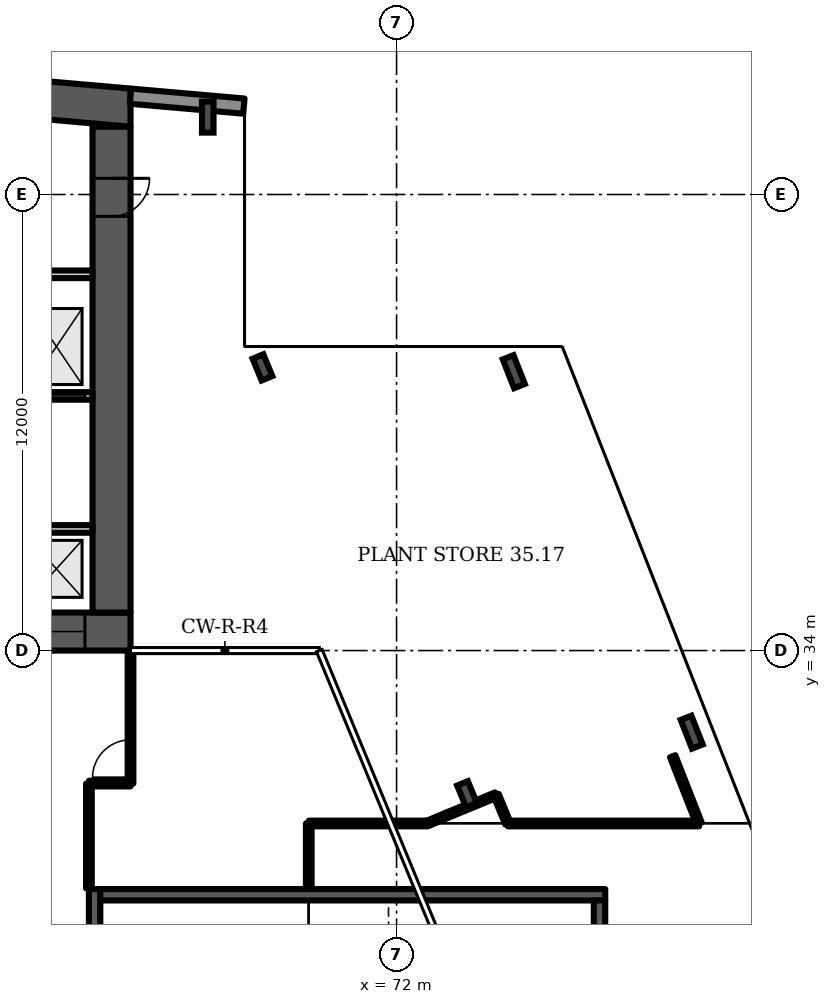
"""IFC4 building model, lengths in metres.
Left out: names, types, materials, properties, quantities, classifications, styles, units other than length and angle.
Written with IfcOpenShell. Run it as: python <this file> out.ifc"""

import sys

from ifc_helpers import new_model, si_unit, direction, frame, frame_2d, origin, origin_2d, place, context, subcontext, project, spatial, polyline, rectangle, i_section, outline, extrude, element, fill, save


model = new_model("IFC4")
c1 = context("Model", 3, precision=1e-05, world=origin(), true_north=direction((0.0, 1.0)))
c2 = subcontext(c1, "Body", "Model", "MODEL_VIEW")
j1 = project(units=[si_unit("LENGTHUNIT", "METRE"), si_unit("PLANEANGLEUNIT", "RADIAN")], contexts=[c1])
p1 = place(None, origin())
s1 = spatial("IfcSite", under=j1, at=p1, CompositionType="ELEMENT")
p2 = place(p1, origin())
s2 = spatial("IfcBuilding", under=s1, at=p2, CompositionType="ELEMENT")
p3 = place(p2, frame((0.0, 0.0, 147.1)))
s3 = spatial("IfcBuildingStorey", under=s2, at=p3, CompositionType="ELEMENT", Elevation=147.1)
p4 = place(p3, frame((0.0, 0.0, -0.0)))
e1 = element("IfcWall", 1, at=p4, inside=s3, PredefinedType="SHEAR", context=c2, shape_type="SweptSolid", body=[
    extrude(outline(polyline([(16.0, 47.784), (40.5, 49.927), (65.0, 47.784), (65.0, 48.787), (40.5, 50.931), (16.0, 48.787), (16.0, 47.784)])), origin(), (0.0, 0.0, 1.0), 4.8),
])
p5 = place(p3, frame((16.0, 34.5, 0.0), z_axis=(0.0, 0.0, 1.0), x_axis=(1.0, 0.0, 0.0)))
e2 = element("IfcWall", 2, at=p5, inside=s3, PredefinedType="SHEAR", context=c2, shape_type="SweptSolid", body=[
    extrude(rectangle(XDim=49.0, YDim=1.0, at=frame_2d((24.5, 0.0))), origin(), (0.0, 0.0, 1.0), 4.8),
])
p6 = place(p5, frame((1.2, 0.0, 0.0)))
e3 = element("IfcOpeningElement", 3, at=p6, cuts=e2, PredefinedType="OPENING", context=c2, shape_type="SweptSolid", body=[
    extrude(rectangle(XDim=1.1, YDim=2.1, at=frame_2d((0.55, 1.05))), frame((0.0, 0.51, 0.0), z_axis=(0.0, -1.0, 0.0), x_axis=(1.0, 0.0, 0.0)), (0.0, 0.0, 1.0), 1.02),
])
p7 = place(p5, frame((5.083, 0.0, 0.0)))
e4 = element("IfcOpeningElement", 4, at=p7, cuts=e2, PredefinedType="OPENING", context=c2, shape_type="SweptSolid", body=[
    extrude(rectangle(XDim=1.1, YDim=2.1, at=frame_2d((0.55, 1.05))), frame((0.0, 0.51, 0.0), z_axis=(0.0, -1.0, 0.0), x_axis=(1.0, 0.0, 0.0)), (0.0, 0.0, 1.0), 1.02),
])
p8 = place(p5, frame((2.933, 0.0, 0.0)))
e5 = element("IfcOpeningElement", 5, at=p8, cuts=e2, PredefinedType="OPENING", context=c2, shape_type="SweptSolid", body=[
    extrude(rectangle(XDim=1.4, YDim=2.1, at=frame_2d((0.7, 1.05))), frame((0.0, 0.51, 0.0), z_axis=(0.0, -1.0, 0.0), x_axis=(1.0, 0.0, 0.0)), (0.0, 0.0, 1.0), 1.02),
])
p9 = place(p5, frame((7.65, 0.0, 0.0)))
e6 = element("IfcOpeningElement", 6, at=p9, cuts=e2, PredefinedType="OPENING", context=c2, shape_type="SweptSolid", body=[
    extrude(rectangle(XDim=1.2, YDim=2.1, at=frame_2d((0.6, 1.05))), frame((0.0, 0.51, 0.0), z_axis=(0.0, -1.0, 0.0), x_axis=(1.0, 0.0, 0.0)), (0.0, 0.0, 1.0), 1.02),
])
p10 = place(p5, frame((14.817, 0.0, 0.0)))
e7 = element("IfcOpeningElement", 7, at=p10, cuts=e2, PredefinedType="OPENING", context=c2, shape_type="SweptSolid", body=[
    extrude(rectangle(XDim=1.1, YDim=2.1, at=frame_2d((0.55, 1.05))), frame((0.0, 0.51, 0.0), z_axis=(0.0, -1.0, 0.0), x_axis=(1.0, 0.0, 0.0)), (0.0, 0.0, 1.0), 1.02),
])
p11 = place(p5, frame((19.083, 0.0, 0.0)))
e8 = element("IfcOpeningElement", 8, at=p11, cuts=e2, PredefinedType="OPENING", context=c2, shape_type="SweptSolid", body=[
    extrude(rectangle(XDim=1.1, YDim=2.1, at=frame_2d((0.55, 1.05))), frame((0.0, 0.51, 0.0), z_axis=(0.0, -1.0, 0.0), x_axis=(1.0, 0.0, 0.0)), (0.0, 0.0, 1.0), 1.02),
])
p12 = place(p5, frame((16.8, 0.0, 0.0)))
e9 = element("IfcOpeningElement", 9, at=p12, cuts=e2, PredefinedType="OPENING", context=c2, shape_type="SweptSolid", body=[
    extrude(rectangle(XDim=1.4, YDim=2.1, at=frame_2d((0.7, 1.05))), frame((0.0, 0.51, 0.0), z_axis=(0.0, -1.0, 0.0), x_axis=(1.0, 0.0, 0.0)), (0.0, 0.0, 1.0), 1.02),
])
p13 = place(p5, frame((21.817, 0.0, 0.0)))
e10 = element("IfcOpeningElement", 10, at=p13, cuts=e2, PredefinedType="OPENING", context=c2, shape_type="SweptSolid", body=[
    extrude(rectangle(XDim=1.1, YDim=2.1, at=frame_2d((0.55, 1.05))), frame((0.0, 0.51, 0.0), z_axis=(0.0, -1.0, 0.0), x_axis=(1.0, 0.0, 0.0)), (0.0, 0.0, 1.0), 1.02),
])
p14 = place(p5, frame((23.95, 0.0, 0.0)))
e11 = element("IfcOpeningElement", 11, at=p14, cuts=e2, PredefinedType="OPENING", context=c2, shape_type="SweptSolid", body=[
    extrude(rectangle(XDim=1.1, YDim=2.1, at=frame_2d((0.55, 1.05))), frame((0.0, 0.51, 0.0), z_axis=(0.0, -1.0, 0.0), x_axis=(1.0, 0.0, 0.0)), (0.0, 0.0, 1.0), 1.02),
])
p15 = place(p5, frame((26.083, 0.0, 0.0)))
e12 = element("IfcOpeningElement", 12, at=p15, cuts=e2, PredefinedType="OPENING", context=c2, shape_type="SweptSolid", body=[
    extrude(rectangle(XDim=1.1, YDim=2.1, at=frame_2d((0.55, 1.05))), frame((0.0, 0.51, 0.0), z_axis=(0.0, -1.0, 0.0), x_axis=(1.0, 0.0, 0.0)), (0.0, 0.0, 1.0), 1.02),
])
p16 = place(p5, frame((33.15, 0.0, 0.0)))
e13 = element("IfcOpeningElement", 13, at=p16, cuts=e2, PredefinedType="OPENING", context=c2, shape_type="SweptSolid", body=[
    extrude(rectangle(XDim=1.2, YDim=2.1, at=frame_2d((0.6, 1.05))), frame((0.0, 0.51, 0.0), z_axis=(0.0, -1.0, 0.0), x_axis=(1.0, 0.0, 0.0)), (0.0, 0.0, 1.0), 1.02),
])
p17 = place(p5, frame((35.817, 0.0, 0.0)))
e14 = element("IfcOpeningElement", 14, at=p17, cuts=e2, PredefinedType="OPENING", context=c2, shape_type="SweptSolid", body=[
    extrude(rectangle(XDim=1.1, YDim=2.1, at=frame_2d((0.55, 1.05))), frame((0.0, 0.51, 0.0), z_axis=(0.0, -1.0, 0.0), x_axis=(1.0, 0.0, 0.0)), (0.0, 0.0, 1.0), 1.02),
])
p18 = place(p5, frame((40.083, 0.0, 0.0)))
e15 = element("IfcOpeningElement", 15, at=p18, cuts=e2, PredefinedType="OPENING", context=c2, shape_type="SweptSolid", body=[
    extrude(rectangle(XDim=1.1, YDim=2.1, at=frame_2d((0.55, 1.05))), frame((0.0, 0.51, 0.0), z_axis=(0.0, -1.0, 0.0), x_axis=(1.0, 0.0, 0.0)), (0.0, 0.0, 1.0), 1.02),
])
p19 = place(p5, frame((37.8, 0.0, 0.0)))
e16 = element("IfcOpeningElement", 16, at=p19, cuts=e2, PredefinedType="OPENING", context=c2, shape_type="SweptSolid", body=[
    extrude(rectangle(XDim=1.4, YDim=2.1, at=frame_2d((0.7, 1.05))), frame((0.0, 0.51, 0.0), z_axis=(0.0, -1.0, 0.0), x_axis=(1.0, 0.0, 0.0)), (0.0, 0.0, 1.0), 1.02),
])
p20 = place(p5, frame((42.817, 0.0, 0.0)))
e17 = element("IfcOpeningElement", 17, at=p20, cuts=e2, PredefinedType="OPENING", context=c2, shape_type="SweptSolid", body=[
    extrude(rectangle(XDim=1.1, YDim=2.1, at=frame_2d((0.55, 1.05))), frame((0.0, 0.51, 0.0), z_axis=(0.0, -1.0, 0.0), x_axis=(1.0, 0.0, 0.0)), (0.0, 0.0, 1.0), 1.02),
])
p21 = place(p5, frame((46.7, 0.0, 0.0)))
e18 = element("IfcOpeningElement", 18, at=p21, cuts=e2, PredefinedType="OPENING", context=c2, shape_type="SweptSolid", body=[
    extrude(rectangle(XDim=1.1, YDim=2.1, at=frame_2d((0.55, 1.05))), frame((0.0, 0.51, 0.0), z_axis=(0.0, -1.0, 0.0), x_axis=(1.0, 0.0, 0.0)), (0.0, 0.0, 1.0), 1.02),
])
p22 = place(p5, frame((44.667, 0.0, 0.0)))
e19 = element("IfcOpeningElement", 19, at=p22, cuts=e2, PredefinedType="OPENING", context=c2, shape_type="SweptSolid", body=[
    extrude(rectangle(XDim=1.4, YDim=2.1, at=frame_2d((0.7, 1.05))), frame((0.0, 0.51, 0.0), z_axis=(0.0, -1.0, 0.0), x_axis=(1.0, 0.0, 0.0)), (0.0, 0.0, 1.0), 1.02),
])
p23 = place(p3, frame((64.5, 35.0, 0.0), z_axis=(0.0, 0.0, 1.0), x_axis=(0.0, 1.0, 0.0)))
e20 = element("IfcWall", 20, at=p23, inside=s3, PredefinedType="SHEAR", context=c2, shape_type="SweptSolid", body=[
    extrude(rectangle(XDim=12.784, YDim=1.0, at=frame_2d((6.392, 0.0))), origin(), (0.0, 0.0, 1.0), 4.8),
])
p24 = place(p23, frame((10.426, 0.0, 0.0)))
e21 = element("IfcOpeningElement", 21, at=p24, cuts=e20, PredefinedType="OPENING", context=c2, shape_type="SweptSolid", body=[
    extrude(rectangle(XDim=1.0, YDim=2.1, at=frame_2d((0.5, 1.05))), frame((0.0, 0.51, 0.0), z_axis=(0.0, -1.0, 0.0), x_axis=(1.0, 0.0, 0.0)), (0.0, 0.0, 1.0), 1.02),
])
for number, where, z_axis, x_axis in (
    (22, (73.854, 30.219, 0.0), (0.0, 0.0, 1.0), (0.924, 0.382, 0.0)),
    (23, (68.472, 41.45, 0.0), (0.0, 0.0, 1.0), (0.924, 0.382, 0.0)),
):
    element("IfcColumn", number, at=place(p3, frame(where, z_axis=z_axis, x_axis=x_axis)), inside=s3, PredefinedType="COLUMN", context=c2, shape_type="SweptSolid", body=[
        extrude(i_section(OverallWidth=0.305, OverallDepth=0.62, WebThickness=0.021, FlangeThickness=0.04, FilletRadius=0.027, at=origin_2d()), origin(), (0.0, 0.0, 1.0), 4.8),
    ])
for number, where, z_axis, x_axis in (
    (24, (79.766, 31.853, 0.0), (0.0, 0.0, 1.0), (0.931, 0.366, 0.0)),
    (25, (75.085, 41.338, 0.0), (0.0, 0.0, 1.0), (0.931, 0.366, 0.0)),
    (26, (67.032, 48.036, 0.0), (0.0, 0.0, 1.0), (1.0, 0.0, 0.0)),
):
    element("IfcColumn", number, at=place(p3, frame(where, z_axis=z_axis, x_axis=x_axis)), inside=s3, PredefinedType="COLUMN", context=c2, shape_type="SweptSolid", body=[
        extrude(i_section(OverallWidth=0.303, OverallDepth=0.814, WebThickness=0.021, FlangeThickness=0.04, FilletRadius=0.03, at=origin_2d()), origin(), (0.0, 0.0, 1.0), 4.8),
    ])
p25 = place(p3, frame((67.983, 48.326, 0.0), z_axis=(0.0, 0.0, 1.0), x_axis=(-0.996194, 0.087168, 0.0)))
e27 = element("IfcWall", 27, at=p25, inside=s3, PredefinedType="SOLIDWALL", context=c2, shape_type="SweptSolid", body=[
    extrude(rectangle(XDim=2.994, YDim=0.4, at=frame_2d((1.497, 0.0))), origin(), (0.0, 0.0, 1.0), 4.4),
])
p26 = place(p3, frame((58.5, 40.7, 0.0), z_axis=(0.0, 0.0, 1.0), x_axis=(1.0, 0.0, 0.0)))
e28 = element("IfcWall", 28, at=p26, inside=s3, PredefinedType="PARTITIONING", context=c2, shape_type="SweptSolid", body=[
    extrude(rectangle(XDim=5.5, YDim=0.2, at=frame_2d((2.75, 0.0))), origin(), (0.0, 0.0, 1.0), 4.4),
])
p27 = place(p26, frame((0.317, 0.0, 0.0)))
e29 = element("IfcOpeningElement", 29, at=p27, cuts=e28, PredefinedType="OPENING", context=c2, shape_type="SweptSolid", body=[
    extrude(rectangle(XDim=1.1, YDim=2.1, at=frame_2d((0.55, 1.05))), frame((0.0, 0.11, 0.0), z_axis=(0.0, -1.0, 0.0), x_axis=(1.0, 0.0, 0.0)), (0.0, 0.0, 1.0), 0.22),
])
p28 = place(p26, frame((2.317, 0.0, 0.0)))
e30 = element("IfcOpeningElement", 30, at=p28, cuts=e28, PredefinedType="OPENING", context=c2, shape_type="SweptSolid", body=[
    extrude(rectangle(XDim=1.1, YDim=2.1, at=frame_2d((0.55, 1.05))), frame((0.0, 0.11, 0.0), z_axis=(0.0, -1.0, 0.0), x_axis=(1.0, 0.0, 0.0)), (0.0, 0.0, 1.0), 0.22),
])
p29 = place(p26, frame((4.2, 0.0, 0.0)))
e31 = element("IfcOpeningElement", 31, at=p29, cuts=e28, PredefinedType="OPENING", context=c2, shape_type="SweptSolid", body=[
    extrude(rectangle(XDim=1.1, YDim=2.1, at=frame_2d((0.55, 1.05))), frame((0.0, 0.11, 0.0), z_axis=(0.0, -1.0, 0.0), x_axis=(1.0, 0.0, 0.0)), (0.0, 0.0, 1.0), 0.22),
])
p30 = place(p3, frame((0.0, 0.0, -0.0)))
e32 = element("IfcWall", 32, at=p30, inside=s3, PredefinedType="PARTITIONING", context=c2, shape_type="SweptSolid", body=[
    extrude(outline(polyline([(62.3, 37.3), (62.5, 37.3), (64.0, 37.3), (64.0, 37.1), (62.5, 37.1), (62.5, 35.0), (62.3, 35.0), (62.3, 37.3)])), origin(), (0.0, 0.0, 1.0), 4.4),
])
p31 = place(p3, frame((0.0, 0.0, -0.0)))
e33 = element("IfcWall", 33, at=p31, inside=s3, PredefinedType="PARTITIONING", context=c2, shape_type="SweptSolid", body=[
    extrude(outline(polyline([(60.433, 40.8), (60.233, 40.8), (60.233, 43.8), (58.5, 43.8), (58.5, 44.0), (64.0, 44.0), (64.0, 43.8), (62.5, 43.8), (62.5, 40.8), (62.3, 40.8), (62.3, 43.8), (60.433, 43.8), (60.433, 40.8)])), origin(), (0.0, 0.0, 1.0), 4.4),
])
p32 = place(p3, frame((64.055, 21.725, 0.0), z_axis=(0.0, 0.0, 1.0), x_axis=(0.0, 1.0, 0.0)))
e34 = element("IfcWall", 34, at=p32, inside=s3, PredefinedType="SHEAR", context=c2, shape_type="SweptSolid", body=[
    extrude(rectangle(XDim=6.0, YDim=0.3, at=frame_2d((3.0, 0.0))), origin(), (0.0, 0.0, 1.0), 4.4),
])
p33 = place(p32, frame((1.575, 0.0, 0.0)))
e35 = element("IfcOpeningElement", 35, at=p33, cuts=e34, PredefinedType="OPENING", context=c2, shape_type="SweptSolid", body=[
    extrude(rectangle(XDim=1.2, YDim=2.1, at=frame_2d((0.6, 1.05))), frame((0.0, 0.16, 0.0), z_axis=(0.0, -1.0, 0.0), x_axis=(1.0, 0.0, 0.0)), (0.0, 0.0, 1.0), 0.32),
])
p34 = place(p3, frame((63.905, 27.745, 0.0), z_axis=(0.0, 0.0, 1.0), x_axis=(0.0, 1.0, 0.0)))
e36 = element("IfcWall", 36, at=p34, inside=s3, PredefinedType="PARTITIONING", context=c2, shape_type="SweptSolid", body=[
    extrude(rectangle(XDim=2.755, YDim=0.15, at=frame_2d((1.377, 0.0))), origin(), (0.0, 0.0, 1.0), 4.4),
])
p35 = place(p3, frame((63.905, 30.5, 0.0), z_axis=(0.0, 0.0, 1.0), x_axis=(1.0, 0.0, 0.0)))
e37 = element("IfcWall", 37, at=p35, inside=s3, PredefinedType="PARTITIONING", context=c2, shape_type="SweptSolid", body=[
    extrude(rectangle(XDim=1.095, YDim=0.15, at=frame_2d((0.547, 0.0))), origin(), (0.0, 0.0, 1.0), 4.4),
])
p36 = place(p3, frame((65.0, 30.5, 0.0), z_axis=(0.0, 0.0, 1.0), x_axis=(0.0, 1.0, 0.0)))
e38 = element("IfcWall", 38, at=p36, inside=s3, PredefinedType="PARTITIONING", context=c2, shape_type="SweptSolid", body=[
    extrude(rectangle(XDim=3.48, YDim=0.15, at=frame_2d((1.74, 0.0))), origin(), (0.0, 0.0, 1.0), 4.4),
])
p37 = place(p36, frame((0.15, 0.0, 0.0)))
e39 = element("IfcOpeningElement", 39, at=p37, cuts=e38, PredefinedType="OPENING", context=c2, shape_type="SweptSolid", body=[
    extrude(rectangle(XDim=1.0, YDim=2.1, at=frame_2d((0.5, 1.05))), frame((0.0, 0.085, 0.0), z_axis=(0.0, -1.0, 0.0), x_axis=(1.0, 0.0, 0.0)), (0.0, 0.0, 1.0), 0.17),
])
p38 = place(p3, frame((69.69, 27.745, 0.0), z_axis=(0.0, 0.0, 1.0), x_axis=(0.0, 1.0, 0.0)))
e40 = element("IfcWall", 40, at=p38, inside=s3, PredefinedType="PARTITIONING", context=c2, shape_type="SweptSolid", body=[
    extrude(rectangle(XDim=1.705, YDim=0.15, at=frame_2d((0.853, 0.0))), origin(), (0.0, 0.0, 1.0), 4.4),
])
p39 = place(p3, frame((69.69, 29.45, 0.0), z_axis=(0.0, 0.0, 1.0), x_axis=(1.0, 0.0, 0.0)))
e41 = element("IfcWall", 41, at=p39, inside=s3, PredefinedType="PARTITIONING", context=c2, shape_type="SweptSolid", body=[
    extrude(rectangle(XDim=3.12, YDim=0.15, at=frame_2d((1.56, 0.0))), origin(), (0.0, 0.0, 1.0), 4.4),
])
p40 = place(p3, frame((72.81, 29.45, 0.0), z_axis=(0.0, 0.0, 1.0), x_axis=(0.922727, 0.385454, 0.0)))
e42 = element("IfcWall", 42, at=p40, inside=s3, PredefinedType="PARTITIONING", context=c2, shape_type="SweptSolid", body=[
    extrude(rectangle(XDim=0.558, YDim=0.15, at=frame_2d((0.279, 0.0))), origin(), (0.0, 0.0, 1.0), 4.4),
])
p41 = place(p3, frame((73.325, 29.665, 0.0), z_axis=(0.0, 0.0, 1.0), x_axis=(0.924271, 0.38173, 0.0)))
e43 = element("IfcWall", 43, at=p41, inside=s3, PredefinedType="PARTITIONING", context=c2, shape_type="SweptSolid", body=[
    extrude(rectangle(XDim=1.401, YDim=0.15, at=frame_2d((0.701, 0.0))), origin(), (0.0, 0.0, 1.0), 4.4),
])
p42 = place(p3, frame((74.93, 29.45, 0.0), z_axis=(0.0, 0.0, 1.0), x_axis=(1.0, 0.0, 0.0)))
e44 = element("IfcWall", 44, at=p42, inside=s3, PredefinedType="PARTITIONING", context=c2, shape_type="SweptSolid", body=[
    extrude(rectangle(XDim=5.03, YDim=0.15, at=frame_2d((2.515, 0.0))), origin(), (0.0, 0.0, 1.0), 4.4),
])
p43 = place(p3, frame((74.93, 29.45, 0.0), z_axis=(0.0, 0.0, 1.0), x_axis=(-0.381793, 0.924246, 0.0)))
e45 = element("IfcWall", 45, at=p43, inside=s3, PredefinedType="PARTITIONING", context=c2, shape_type="SweptSolid", body=[
    extrude(rectangle(XDim=0.812, YDim=0.15, at=frame_2d((0.406, 0.0))), origin(), (0.0, 0.0, 1.0), 4.4),
])
p44 = place(p3, frame((79.96, 29.45, 0.0), z_axis=(0.0, 0.0, 1.0), x_axis=(-0.365519, 0.930809, 0.0)))
e46 = element("IfcWall", 46, at=p44, inside=s3, PredefinedType="PARTITIONING", context=c2, shape_type="SweptSolid", body=[
    extrude(rectangle(XDim=1.902, YDim=0.15, at=frame_2d((0.951, 0.0))), origin(), (0.0, 0.0, 1.0), 4.4),
])
p45 = place(p3, frame((64.205, 27.575, 0.0), z_axis=(0.0, 0.0, 1.0), x_axis=(1.0, 0.0, 0.0)))
e47 = element("IfcWall", 47, at=p45, inside=s3, PredefinedType="SHEAR", context=c2, shape_type="SweptSolid", body=[
    extrude(rectangle(XDim=13.286, YDim=0.3, at=frame_2d((6.643, 0.0))), origin(), (0.0, 0.0, 1.0), 4.4),
])
p46 = place(p3, frame((77.34, 22.025, 0.0), z_axis=(0.0, 0.0, 1.0), x_axis=(0.0, 1.0, 0.0)))
e48 = element("IfcWall", 48, at=p46, inside=s3, PredefinedType="SHEAR", context=c2, shape_type="SweptSolid", body=[
    extrude(rectangle(XDim=5.4, YDim=0.3, at=frame_2d((2.7, 0.0))), origin(), (0.0, 0.0, 1.0), 4.4),
])
p47 = place(p21, origin())
e49 = element("IfcDoor", 49, at=p47, inside=s3, OperationType="DOUBLE_DOOR_SLIDING", PredefinedType="DOOR", context=c2, shape_type="SweptSolid", body=[
    extrude(rectangle(XDim=1.1, YDim=2.1, at=frame_2d((0.55, 1.05))), frame((0.0, 0.025, 0.0), z_axis=(0.0, -1.0, 0.0), x_axis=(1.0, 0.0, 0.0)), (0.0, 0.0, 1.0), 0.05),
])
fill(e18, e49)
p48 = place(p29, origin())
e50 = element("IfcDoor", 50, at=p48, inside=s3, OperationType="DOUBLE_DOOR_SLIDING", PredefinedType="DOOR", context=c2, shape_type="SweptSolid", body=[
    extrude(rectangle(XDim=1.1, YDim=2.1, at=frame_2d((0.55, 1.05))), frame((0.0, 0.025, 0.0), z_axis=(0.0, -1.0, 0.0), x_axis=(1.0, 0.0, 0.0)), (0.0, 0.0, 1.0), 0.05),
])
fill(e31, e50)
p49 = place(p24, origin())
e51 = element("IfcDoor", 51, at=p49, inside=s3, OperationType="SINGLE_SWING_RIGHT", PredefinedType="DOOR", context=c2, shape_type="SweptSolid", body=[
    extrude(rectangle(XDim=1.0, YDim=2.1, at=frame_2d((0.5, 1.05))), frame((0.0, 0.5, 0.0), z_axis=(0.0, -1.0, 0.0), x_axis=(1.0, 0.0, 0.0)), (0.0, 0.0, 1.0), 1.0),
])
fill(e21, e51)
p50 = place(p37, origin())
e52 = element("IfcDoor", 52, at=p50, inside=s3, OperationType="SINGLE_SWING_LEFT", PredefinedType="DOOR", context=c2, shape_type="SweptSolid", body=[
    extrude(rectangle(XDim=1.0, YDim=2.1, at=frame_2d((0.5, 1.05))), frame((0.0, 0.025, 0.0), z_axis=(0.0, -1.0, 0.0), x_axis=(1.0, 0.0, 0.0)), (0.0, 0.0, 1.0), 0.05),
])
fill(e39, e52)
save(model, sys.argv[1])
